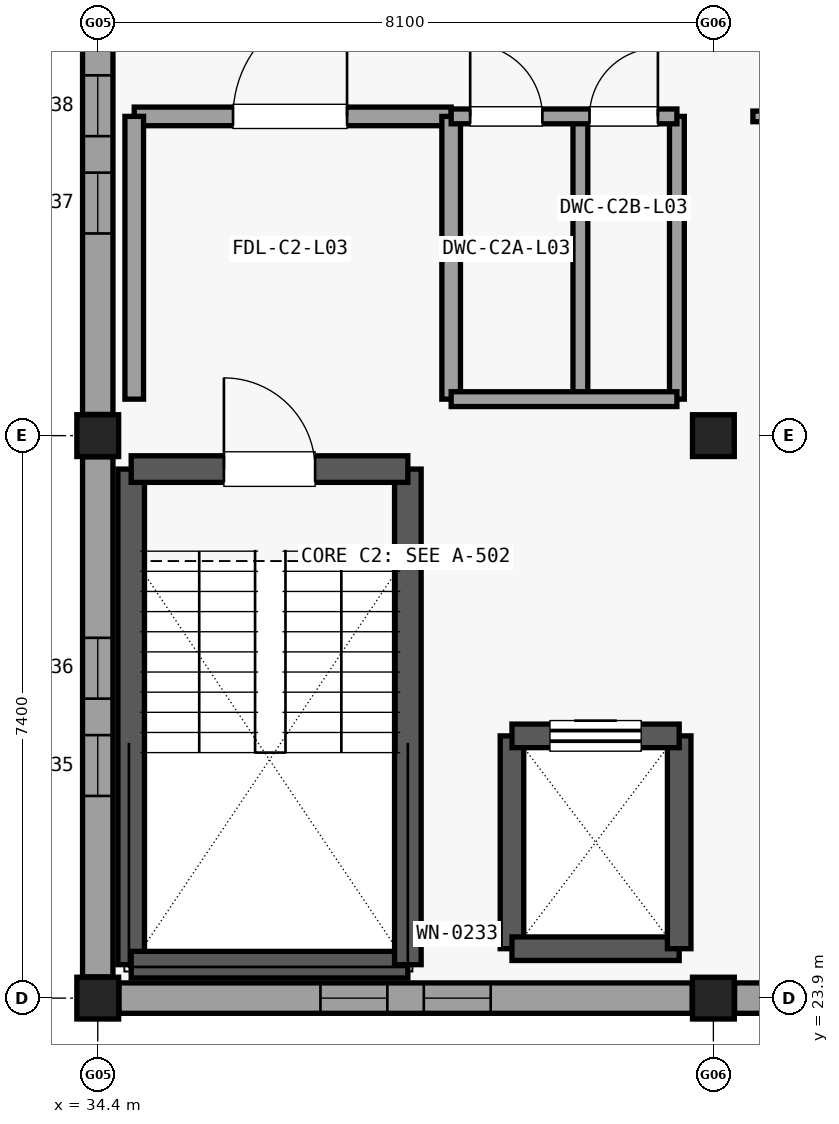
"""IFC4 building model, lengths in metres.
Left out: names, types, materials, properties, quantities, classifications, styles, units other than length and angle.
Written with IfcOpenShell. Run it as: python <this file> out.ifc"""

import sys

from ifc_helpers import new_model, si_unit, direction, frame, frame_2d, origin, origin_2d, place, context, subcontext, project, spatial, rectangle, extrude, element, fill, save


model = new_model("IFC4")
c1 = context("Model", 3, precision=1e-05, world=origin(), true_north=direction((0.0, 1.0)))
c2 = subcontext(c1, "Body", "Model", "MODEL_VIEW")
j1 = project(units=[si_unit("LENGTHUNIT", "METRE"), si_unit("PLANEANGLEUNIT", "RADIAN")], contexts=[c1])
p1 = place(None, origin())
s1 = spatial("IfcSite", under=j1, at=p1, CompositionType="ELEMENT")
p2 = place(p1, origin())
s2 = spatial("IfcBuilding", under=s1, at=p2, CompositionType="ELEMENT")
p3 = place(p2, frame((0.0, 0.0, 13.8)))
s3 = spatial("IfcBuildingStorey", under=s2, at=p3, CompositionType="ELEMENT", Elevation=13.8)
for number, where, z_axis, x_axis in (
    (1, (34.4, 23.9, 0.0), (0.0, 0.0, 1.0), (1.0, 0.0, 0.0)),
    (2, (34.4, 31.3, 0.0), (0.0, 0.0, 1.0), (1.0, 0.0, 0.0)),
    (3, (42.5, 23.9, 0.0), (0.0, 0.0, 1.0), (1.0, 0.0, 0.0)),
    (4, (42.5, 31.3, 0.0), (0.0, 0.0, 1.0), (1.0, 0.0, 0.0)),
):
    element("IfcColumn", number, at=place(p3, frame(where, z_axis=z_axis, x_axis=x_axis)), inside=s3, PredefinedType="COLUMN", context=c2, shape_type="SweptSolid", body=[
        extrude(rectangle(XDim=0.55, YDim=0.55, at=origin_2d()), origin(), (0.0, 0.0, 1.0), 3.38),
    ])
p4 = place(p3, frame((42.221, 23.9, 0.0), z_axis=(0.0, 0.0, 1.0), x_axis=(-1.0, 0.0, 0.0)))
e5 = element("IfcWall", 5, at=p4, inside=s3, PredefinedType="SOLIDWALL", context=c2, shape_type="SweptSolid", body=[
    extrude(rectangle(XDim=7.542, YDim=0.4, at=frame_2d((3.771, 0.0))), origin(), (0.0, 0.0, 1.0), 2.908),
])
p5 = place(p4, frame((2.651, 0.0, 0.6)))
e6 = element("IfcOpeningElement", 6, at=p5, cuts=e5, PredefinedType="OPENING", context=c2, shape_type="SweptSolid", body=[
    extrude(rectangle(XDim=0.88, YDim=1.9, at=frame_2d((0.44, 0.95))), frame((0.0, 0.21, 0.0), z_axis=(0.0, -1.0, 0.0), x_axis=(1.0, 0.0, 0.0)), (0.0, 0.0, 1.0), 0.42),
])
p6 = place(p4, frame((4.011, 0.0, 0.6)))
e7 = element("IfcOpeningElement", 7, at=p6, cuts=e5, PredefinedType="OPENING", context=c2, shape_type="SweptSolid", body=[
    extrude(rectangle(XDim=0.88, YDim=1.9, at=frame_2d((0.44, 0.95))), frame((0.0, 0.21, 0.0), z_axis=(0.0, -1.0, 0.0), x_axis=(1.0, 0.0, 0.0)), (0.0, 0.0, 1.0), 0.42),
])
p7 = place(p3, frame((34.4, 24.179, 0.0), z_axis=(0.0, 0.0, 1.0), x_axis=(0.0, 1.0, 0.0)))
e8 = element("IfcWall", 8, at=p7, inside=s3, PredefinedType="SOLIDWALL", context=c2, shape_type="SweptSolid", body=[
    extrude(rectangle(XDim=6.842, YDim=0.4, at=frame_2d((3.421, 0.0))), origin(), (0.0, 0.0, 1.0), 2.908),
])
p8 = place(p7, frame((2.381, 0.0, 0.6)))
e9 = element("IfcOpeningElement", 9, at=p8, cuts=e8, PredefinedType="OPENING", context=c2, shape_type="SweptSolid", body=[
    extrude(rectangle(XDim=0.8, YDim=1.92, at=frame_2d((0.4, 0.96))), frame((0.0, 0.21, 0.0), z_axis=(0.0, -1.0, 0.0), x_axis=(1.0, 0.0, 0.0)), (0.0, 0.0, 1.0), 0.42),
])
p9 = place(p7, frame((3.661, 0.0, 0.6)))
e10 = element("IfcOpeningElement", 10, at=p9, cuts=e8, PredefinedType="OPENING", context=c2, shape_type="SweptSolid", body=[
    extrude(rectangle(XDim=0.8, YDim=1.92, at=frame_2d((0.4, 0.96))), frame((0.0, 0.21, 0.0), z_axis=(0.0, -1.0, 0.0), x_axis=(1.0, 0.0, 0.0)), (0.0, 0.0, 1.0), 0.42),
])
p10 = place(p3, frame((34.4, 31.579, 0.0), z_axis=(0.0, 0.0, 1.0), x_axis=(0.0, 1.0, 0.0)))
e11 = element("IfcWall", 11, at=p10, inside=s3, PredefinedType="SOLIDWALL", context=c2, shape_type="SweptSolid", body=[
    extrude(rectangle(XDim=6.842, YDim=0.4, at=frame_2d((3.421, 0.0))), origin(), (0.0, 0.0, 1.0), 2.908),
])
p11 = place(p10, frame((2.381, 0.0, 0.6)))
e12 = element("IfcOpeningElement", 12, at=p11, cuts=e11, PredefinedType="OPENING", context=c2, shape_type="SweptSolid", body=[
    extrude(rectangle(XDim=0.8, YDim=1.92, at=frame_2d((0.4, 0.96))), frame((0.0, 0.21, 0.0), z_axis=(0.0, -1.0, 0.0), x_axis=(1.0, 0.0, 0.0)), (0.0, 0.0, 1.0), 0.42),
])
p12 = place(p10, frame((3.661, 0.0, 0.6)))
e13 = element("IfcOpeningElement", 13, at=p12, cuts=e11, PredefinedType="OPENING", context=c2, shape_type="SweptSolid", body=[
    extrude(rectangle(XDim=0.8, YDim=1.92, at=frame_2d((0.4, 0.96))), frame((0.0, 0.21, 0.0), z_axis=(0.0, -1.0, 0.0), x_axis=(1.0, 0.0, 0.0)), (0.0, 0.0, 1.0), 0.42),
])
p13 = place(p3, frame((50.321, 23.9, 0.0), z_axis=(0.0, 0.0, 1.0), x_axis=(-1.0, 0.0, 0.0)))
e14 = element("IfcWall", 14, at=p13, inside=s3, PredefinedType="SOLIDWALL", context=c2, shape_type="SweptSolid", body=[
    extrude(rectangle(XDim=7.542, YDim=0.4, at=frame_2d((3.771, 0.0))), origin(), (0.0, 0.0, 1.0), 2.908),
])
p14 = place(p13, frame((2.651, 0.0, 0.6)))
e15 = element("IfcOpeningElement", 15, at=p14, cuts=e14, PredefinedType="OPENING", context=c2, shape_type="SweptSolid", body=[
    extrude(rectangle(XDim=0.88, YDim=1.9, at=frame_2d((0.44, 0.95))), frame((0.0, 0.21, 0.0), z_axis=(0.0, -1.0, 0.0), x_axis=(1.0, 0.0, 0.0)), (0.0, 0.0, 1.0), 0.42),
])
p15 = place(p13, frame((4.011, 0.0, 0.6)))
e16 = element("IfcOpeningElement", 16, at=p15, cuts=e14, PredefinedType="OPENING", context=c2, shape_type="SweptSolid", body=[
    extrude(rectangle(XDim=0.88, YDim=1.9, at=frame_2d((0.44, 0.95))), frame((0.0, 0.21, 0.0), z_axis=(0.0, -1.0, 0.0), x_axis=(1.0, 0.0, 0.0)), (0.0, 0.0, 1.0), 0.42),
])
p16 = place(p3, frame((34.84, 24.34, 0.0), z_axis=(0.0, 0.0, 1.0), x_axis=(0.0, 1.0, 0.0)))
e17 = element("IfcWall", 17, at=p16, inside=s3, PredefinedType="SHEAR", context=c2, shape_type="SweptSolid", body=[
    extrude(rectangle(XDim=6.52, YDim=0.35, at=frame_2d((3.26, 0.0))), origin(), (0.0, 0.0, 1.0), 3.375),
])
p17 = place(p3, frame((34.84, 24.34, 0.0), z_axis=(0.0, 0.0, 1.0), x_axis=(1.0, 0.0, 0.0)))
e18 = element("IfcWall", 18, at=p17, inside=s3, PredefinedType="SHEAR", context=c2, shape_type="SweptSolid", body=[
    extrude(rectangle(XDim=3.64, YDim=0.35, at=frame_2d((1.82, 0.0))), origin(), (0.0, 0.0, 1.0), 3.375),
])
p18 = place(p3, frame((38.48, 24.34, 0.0), z_axis=(0.0, 0.0, 1.0), x_axis=(0.0, 1.0, 0.0)))
e19 = element("IfcWall", 19, at=p18, inside=s3, PredefinedType="SHEAR", context=c2, shape_type="SweptSolid", body=[
    extrude(rectangle(XDim=6.52, YDim=0.35, at=frame_2d((3.26, 0.0))), origin(), (0.0, 0.0, 1.0), 3.375),
])
p19 = place(p3, frame((34.84, 30.86, 0.0), z_axis=(0.0, 0.0, 1.0), x_axis=(1.0, 0.0, 0.0)))
e20 = element("IfcWall", 20, at=p19, inside=s3, PredefinedType="SHEAR", context=c2, shape_type="SweptSolid", body=[
    extrude(rectangle(XDim=3.64, YDim=0.35, at=frame_2d((1.82, 0.0))), origin(), (0.0, 0.0, 1.0), 3.375),
])
p20 = place(p19, frame((1.22, 0.0, 0.0)))
e21 = element("IfcOpeningElement", 21, at=p20, cuts=e20, PredefinedType="OPENING", context=c2, shape_type="SweptSolid", body=[
    extrude(rectangle(XDim=1.2, YDim=2.15, at=frame_2d((0.6, 1.075))), frame((0.0, 0.185, 0.0), z_axis=(0.0, -1.0, 0.0), x_axis=(1.0, 0.0, 0.0)), (0.0, 0.0, 1.0), 0.37),
])
p21 = place(p3, frame((39.85, 24.55, 0.0), z_axis=(0.0, 0.0, 1.0), x_axis=(0.0, 1.0, 0.0)))
e22 = element("IfcWall", 22, at=p21, inside=s3, PredefinedType="SHEAR", context=c2, shape_type="SweptSolid", body=[
    extrude(rectangle(XDim=2.8, YDim=0.31, at=frame_2d((1.4, 0.0))), origin(), (0.0, 0.0, 1.0), 3.375),
])
p22 = place(p3, frame((39.85, 24.55, 0.0), z_axis=(0.0, 0.0, 1.0), x_axis=(1.0, 0.0, 0.0)))
e23 = element("IfcWall", 23, at=p22, inside=s3, PredefinedType="SHEAR", context=c2, shape_type="SweptSolid", body=[
    extrude(rectangle(XDim=2.2, YDim=0.31, at=frame_2d((1.1, 0.0))), origin(), (0.0, 0.0, 1.0), 3.375),
])
p23 = place(p3, frame((42.05, 24.55, 0.0), z_axis=(0.0, 0.0, 1.0), x_axis=(0.0, 1.0, 0.0)))
e24 = element("IfcWall", 24, at=p23, inside=s3, PredefinedType="SHEAR", context=c2, shape_type="SweptSolid", body=[
    extrude(rectangle(XDim=2.8, YDim=0.31, at=frame_2d((1.4, 0.0))), origin(), (0.0, 0.0, 1.0), 3.375),
])
p24 = place(p3, frame((39.85, 27.35, 0.0), z_axis=(0.0, 0.0, 1.0), x_axis=(1.0, 0.0, 0.0)))
e25 = element("IfcWall", 25, at=p24, inside=s3, PredefinedType="SHEAR", context=c2, shape_type="SweptSolid", body=[
    extrude(rectangle(XDim=2.2, YDim=0.31, at=frame_2d((1.1, 0.0))), origin(), (0.0, 0.0, 1.0), 3.375),
])
p25 = place(p24, frame((0.5, 0.0, 0.0)))
e26 = element("IfcOpeningElement", 26, at=p25, cuts=e25, PredefinedType="OPENING", context=c2, shape_type="SweptSolid", body=[
    extrude(rectangle(XDim=1.2, YDim=2.15, at=frame_2d((0.6, 1.075))), frame((0.0, 0.165, 0.0), z_axis=(0.0, -1.0, 0.0), x_axis=(1.0, 0.0, 0.0)), (0.0, 0.0, 1.0), 0.33),
])
p26 = place(p3, frame((34.88, 35.5, 0.0), z_axis=(0.0, 0.0, 1.0), x_axis=(1.0, 0.0, 0.0)))
e27 = element("IfcWall", 27, at=p26, inside=s3, PredefinedType="PARTITIONING", context=c2, shape_type="SweptSolid", body=[
    extrude(rectangle(XDim=4.17, YDim=0.245, at=frame_2d((2.085, 0.0))), origin(), (0.0, 0.0, 1.0), 2.913),
])
p27 = place(p26, frame((1.3, 0.0, 0.0)))
e28 = element("IfcOpeningElement", 28, at=p27, cuts=e27, PredefinedType="OPENING", context=c2, shape_type="SweptSolid", body=[
    extrude(rectangle(XDim=1.5, YDim=2.15, at=frame_2d((0.75, 1.075))), frame((0.0, 0.133, 0.0), z_axis=(0.0, -1.0, 0.0), x_axis=(1.0, 0.0, 0.0)), (0.0, 0.0, 1.0), 0.265),
])
for number, where, z_axis, x_axis in (
    (29, (34.88, 31.78, 0.0), (0.0, 0.0, 1.0), (0.0, 1.0, 0.0)),
    (30, (39.05, 31.78, 0.0), (0.0, 0.0, 1.0), (0.0, 1.0, 0.0)),
):
    element("IfcWall", number, at=place(p3, frame(where, z_axis=z_axis, x_axis=x_axis)), inside=s3, PredefinedType="PARTITIONING", context=c2, shape_type="SweptSolid", body=[
        extrude(rectangle(XDim=3.72, YDim=0.245, at=frame_2d((1.86, 0.0))), origin(), (0.0, 0.0, 1.0), 2.913),
    ])
for number, where, z_axis, x_axis in (
    (31, (40.75, 31.78, 0.0), (0.0, 0.0, 1.0), (0.0, 1.0, 0.0)),
    (32, (42.02, 31.78, 0.0), (0.0, 0.0, 1.0), (0.0, 1.0, 0.0)),
):
    element("IfcWall", number, at=place(p3, frame(where, z_axis=z_axis, x_axis=x_axis)), inside=s3, PredefinedType="PARTITIONING", context=c2, shape_type="SweptSolid", body=[
        extrude(rectangle(XDim=3.72, YDim=0.195, at=frame_2d((1.86, 0.0))), origin(), (0.0, 0.0, 1.0), 2.913),
    ])
p28 = place(p3, frame((39.05, 31.78, 0.0), z_axis=(0.0, 0.0, 1.0), x_axis=(1.0, 0.0, 0.0)))
e33 = element("IfcWall", 33, at=p28, inside=s3, PredefinedType="PARTITIONING", context=c2, shape_type="SweptSolid", body=[
    extrude(rectangle(XDim=2.97, YDim=0.195, at=frame_2d((1.485, 0.0))), origin(), (0.0, 0.0, 1.0), 2.913),
])
p29 = place(p3, frame((39.05, 35.5, 0.0), z_axis=(0.0, 0.0, 1.0), x_axis=(1.0, 0.0, 0.0)))
e34 = element("IfcWall", 34, at=p29, inside=s3, PredefinedType="PARTITIONING", context=c2, shape_type="SweptSolid", body=[
    extrude(rectangle(XDim=2.97, YDim=0.195, at=frame_2d((1.485, 0.0))), origin(), (0.0, 0.0, 1.0), 2.913),
])
p30 = place(p29, frame((0.25, 0.0, 0.0)))
e35 = element("IfcOpeningElement", 35, at=p30, cuts=e34, PredefinedType="OPENING", context=c2, shape_type="SweptSolid", body=[
    extrude(rectangle(XDim=0.95, YDim=2.1, at=frame_2d((0.475, 1.05))), frame((0.0, 0.107, 0.0), z_axis=(0.0, -1.0, 0.0), x_axis=(1.0, 0.0, 0.0)), (0.0, 0.0, 1.0), 0.215),
])
p31 = place(p29, frame((1.82, 0.0, 0.0)))
e36 = element("IfcOpeningElement", 36, at=p31, cuts=e34, PredefinedType="OPENING", context=c2, shape_type="SweptSolid", body=[
    extrude(rectangle(XDim=0.9, YDim=2.1, at=frame_2d((0.45, 1.05))), frame((0.0, 0.107, 0.0), z_axis=(0.0, -1.0, 0.0), x_axis=(1.0, 0.0, 0.0)), (0.0, 0.0, 1.0), 0.215),
])
p32 = place(p3, frame((43.02, 35.5, 0.0), z_axis=(0.0, 0.0, 1.0), x_axis=(1.0, 0.0, 0.0)))
e37 = element("IfcWall", 37, at=p32, inside=s3, PredefinedType="PARTITIONING", context=c2, shape_type="SweptSolid", body=[
    extrude(rectangle(XDim=7.06, YDim=0.14, at=frame_2d((3.53, 0.0))), origin(), (0.0, 0.0, 1.0), 2.913),
])
p33 = place(p32, frame((2.805, 0.0, 0.0)))
e38 = element("IfcOpeningElement", 38, at=p33, cuts=e37, PredefinedType="OPENING", context=c2, shape_type="SweptSolid", body=[
    extrude(rectangle(XDim=1.45, YDim=2.2, at=frame_2d((0.725, 1.1))), frame((0.0, 0.08, 0.0), z_axis=(0.0, -1.0, 0.0), x_axis=(1.0, 0.0, 0.0)), (0.0, 0.0, 1.0), 0.16),
])
p34 = place(p5, origin())
e39 = element("IfcWindow", 39, at=p34, inside=s3, PartitioningType="SINGLE_PANEL", PredefinedType="WINDOW", context=c2, shape_type="SweptSolid", body=[
    extrude(rectangle(XDim=0.88, YDim=1.9, at=frame_2d((0.44, 0.95))), frame((0.0, 0.03, 0.0), z_axis=(0.0, -1.0, 0.0), x_axis=(1.0, 0.0, 0.0)), (0.0, 0.0, 1.0), 0.06),
])
fill(e6, e39)
p35 = place(p6, origin())
e40 = element("IfcWindow", 40, at=p35, inside=s3, PartitioningType="SINGLE_PANEL", PredefinedType="WINDOW", context=c2, shape_type="SweptSolid", body=[
    extrude(rectangle(XDim=0.88, YDim=1.9, at=frame_2d((0.44, 0.95))), frame((0.0, 0.03, 0.0), z_axis=(0.0, -1.0, 0.0), x_axis=(1.0, 0.0, 0.0)), (0.0, 0.0, 1.0), 0.06),
])
fill(e7, e40)
p36 = place(p8, origin())
e41 = element("IfcWindow", 41, at=p36, inside=s3, PartitioningType="SINGLE_PANEL", PredefinedType="WINDOW", context=c2, shape_type="SweptSolid", body=[
    extrude(rectangle(XDim=0.8, YDim=1.92, at=frame_2d((0.4, 0.96))), frame((0.0, 0.03, 0.0), z_axis=(0.0, -1.0, 0.0), x_axis=(1.0, 0.0, 0.0)), (0.0, 0.0, 1.0), 0.06),
])
fill(e9, e41)
p37 = place(p9, origin())
e42 = element("IfcWindow", 42, at=p37, inside=s3, PartitioningType="SINGLE_PANEL", PredefinedType="WINDOW", context=c2, shape_type="SweptSolid", body=[
    extrude(rectangle(XDim=0.8, YDim=1.92, at=frame_2d((0.4, 0.96))), frame((0.0, 0.03, 0.0), z_axis=(0.0, -1.0, 0.0), x_axis=(1.0, 0.0, 0.0)), (0.0, 0.0, 1.0), 0.06),
])
fill(e10, e42)
p38 = place(p11, origin())
e43 = element("IfcWindow", 43, at=p38, inside=s3, PartitioningType="SINGLE_PANEL", PredefinedType="WINDOW", context=c2, shape_type="SweptSolid", body=[
    extrude(rectangle(XDim=0.8, YDim=1.92, at=frame_2d((0.4, 0.96))), frame((0.0, 0.03, 0.0), z_axis=(0.0, -1.0, 0.0), x_axis=(1.0, 0.0, 0.0)), (0.0, 0.0, 1.0), 0.06),
])
fill(e12, e43)
p39 = place(p12, origin())
e44 = element("IfcWindow", 44, at=p39, inside=s3, PartitioningType="SINGLE_PANEL", PredefinedType="WINDOW", context=c2, shape_type="SweptSolid", body=[
    extrude(rectangle(XDim=0.8, YDim=1.92, at=frame_2d((0.4, 0.96))), frame((0.0, 0.03, 0.0), z_axis=(0.0, -1.0, 0.0), x_axis=(1.0, 0.0, 0.0)), (0.0, 0.0, 1.0), 0.06),
])
fill(e13, e44)
p40 = place(p20, origin())
e45 = element("IfcDoor", 45, at=p40, inside=s3, OperationType="SINGLE_SWING_LEFT", PredefinedType="DOOR", context=c2, shape_type="SweptSolid", body=[
    extrude(rectangle(XDim=1.2, YDim=2.15, at=frame_2d((0.6, 1.075))), frame((0.0, 0.025, 0.0), z_axis=(0.0, -1.0, 0.0), x_axis=(1.0, 0.0, 0.0)), (0.0, 0.0, 1.0), 0.05),
])
fill(e21, e45)
p41 = place(p25, origin())
e46 = element("IfcDoor", 46, at=p41, inside=s3, OperationType="SLIDING_TO_LEFT", PredefinedType="DOOR", context=c2, shape_type="SweptSolid", body=[
    extrude(rectangle(XDim=1.2, YDim=2.15, at=frame_2d((0.6, 1.075))), frame((0.0, 0.025, 0.0), z_axis=(0.0, -1.0, 0.0), x_axis=(1.0, 0.0, 0.0)), (0.0, 0.0, 1.0), 0.05),
])
fill(e26, e46)
p42 = place(p27, origin())
e47 = element("IfcDoor", 47, at=p42, inside=s3, OperationType="SINGLE_SWING_RIGHT", PredefinedType="DOOR", context=c2, shape_type="SweptSolid", body=[
    extrude(rectangle(XDim=1.5, YDim=2.15, at=frame_2d((0.75, 1.075))), frame((0.0, 0.025, 0.0), z_axis=(0.0, -1.0, 0.0), x_axis=(1.0, 0.0, 0.0)), (0.0, 0.0, 1.0), 0.05),
])
fill(e28, e47)
p43 = place(p30, origin())
e48 = element("IfcDoor", 48, at=p43, inside=s3, OperationType="SINGLE_SWING_LEFT", PredefinedType="DOOR", context=c2, shape_type="SweptSolid", body=[
    extrude(rectangle(XDim=0.95, YDim=2.1, at=frame_2d((0.475, 1.05))), frame((0.0, 0.025, 0.0), z_axis=(0.0, -1.0, 0.0), x_axis=(1.0, 0.0, 0.0)), (0.0, 0.0, 1.0), 0.05),
])
fill(e35, e48)
p44 = place(p31, origin())
e49 = element("IfcDoor", 49, at=p44, inside=s3, OperationType="SINGLE_SWING_RIGHT", PredefinedType="DOOR", context=c2, shape_type="SweptSolid", body=[
    extrude(rectangle(XDim=0.9, YDim=2.1, at=frame_2d((0.45, 1.05))), frame((0.0, 0.025, 0.0), z_axis=(0.0, -1.0, 0.0), x_axis=(1.0, 0.0, 0.0)), (0.0, 0.0, 1.0), 0.05),
])
fill(e36, e49)
save(model, sys.argv[1])
